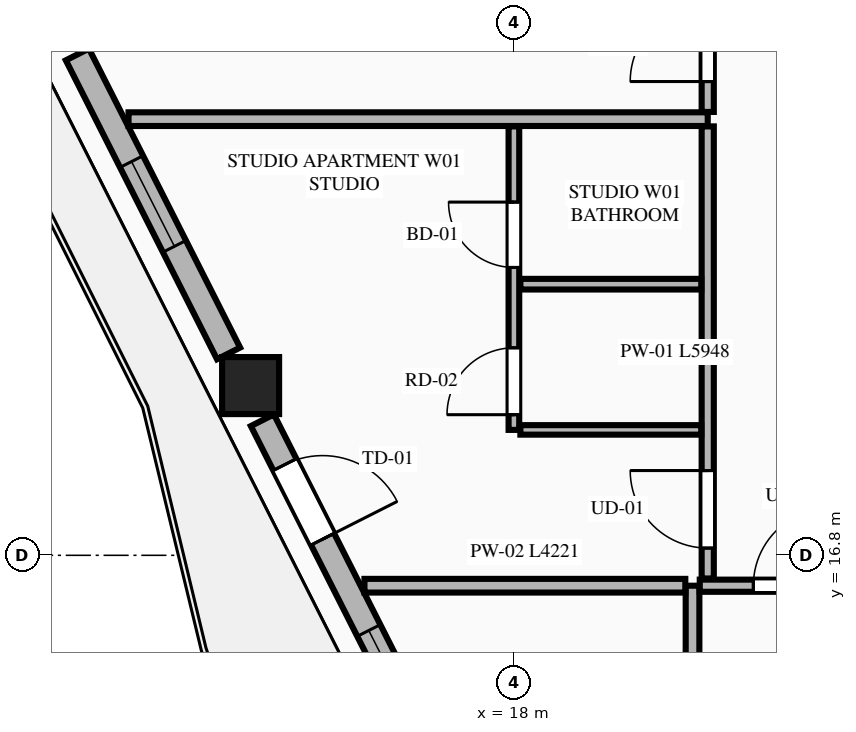
"""IFC4 building model, lengths in metres.
Left out: names, types, materials, properties, quantities, classifications, styles, units other than length and angle.
Written with IfcOpenShell. Run it as: python <this file> out.ifc"""

import sys

from ifc_helpers import new_model, si_unit, direction, frame, frame_2d, origin, origin_2d, place, context, subcontext, project, spatial, rectangle, extrude, element, fill, save


model = new_model("IFC4")
c1 = context("Model", 3, precision=1e-05, world=origin(), true_north=direction((0.0, 1.0)))
c2 = subcontext(c1, "Body", "Model", "MODEL_VIEW")
j1 = project(units=[si_unit("LENGTHUNIT", "METRE"), si_unit("PLANEANGLEUNIT", "RADIAN")], contexts=[c1])
p1 = place(None, origin())
s1 = spatial("IfcSite", under=j1, at=p1, CompositionType="ELEMENT")
p2 = place(p1, origin())
s2 = spatial("IfcBuilding", under=s1, at=p2, CompositionType="ELEMENT")
p3 = place(p2, frame((0.0, 0.0, 245.25)))
s3 = spatial("IfcBuildingStorey", under=s2, at=p3, CompositionType="ELEMENT", Elevation=245.25)
p4 = place(p3, frame((14.536, 19.033, 0.0), z_axis=(0.0, 0.0, 1.0), x_axis=(1.0, 0.0, 0.0)))
e1 = element("IfcColumn", 1, at=p4, inside=s3, PredefinedType="COLUMN", context=c2, shape_type="SweptSolid", body=[
    extrude(rectangle(XDim=0.75, YDim=0.75, at=origin_2d()), origin(), (0.0, 0.0, 1.0), 3.65),
])
p5 = place(p3, frame((12.257, 23.389, 0.0), z_axis=(0.0, 0.0, 1.0), x_axis=(0.45130817501, -0.892368158984, 0.0)))
e2 = element("IfcWall", 2, at=p5, inside=s3, PredefinedType="STANDARD", context=c2, shape_type="SweptSolid", body=[
    extrude(rectangle(XDim=4.407, YDim=0.34, at=frame_2d((2.204, 0.0))), origin(), (0.0, 0.0, 1.0), 2.983),
])
p6 = place(p5, frame((1.579, 0.0, 0.75)))
e3 = element("IfcOpeningElement", 3, at=p6, cuts=e2, PredefinedType="OPENING", context=c2, shape_type="SweptSolid", body=[
    extrude(rectangle(XDim=1.25, YDim=1.95, at=frame_2d((0.625, 0.975))), frame((0.0, 0.18, 0.0), z_axis=(0.0, -1.0, 0.0), x_axis=(1.0, 0.0, 0.0)), (0.0, 0.0, 1.0), 0.36),
])
p7 = place(p3, frame((14.691, 18.577, 0.0), z_axis=(0.0, 0.0, 1.0), x_axis=(0.451581819983, -0.892229712496, 0.0)))
e4 = element("IfcWall", 4, at=p7, inside=s3, PredefinedType="STANDARD", context=c2, shape_type="SweptSolid", body=[
    extrude(rectangle(XDim=4.6, YDim=0.34, at=frame_2d((2.3, 0.0))), origin(), (0.0, 0.0, 1.0), 2.983),
])
p8 = place(p7, frame((0.654, 0.0, 0.0)))
e5 = element("IfcOpeningElement", 5, at=p8, cuts=e4, PredefinedType="OPENING", context=c2, shape_type="SweptSolid", body=[
    extrude(rectangle(XDim=1.1, YDim=2.25, at=frame_2d((0.55, 1.125))), frame((0.0, 0.18, 0.0), z_axis=(0.0, -1.0, 0.0), x_axis=(1.0, 0.0, 0.0)), (0.0, 0.0, 1.0), 0.36),
])
p9 = place(p7, frame((3.1, 0.0, 0.75)))
e6 = element("IfcOpeningElement", 6, at=p9, cuts=e4, PredefinedType="OPENING", context=c2, shape_type="SweptSolid", body=[
    extrude(rectangle(XDim=1.1, YDim=2.0, at=frame_2d((0.55, 1.0))), frame((0.0, 0.18, 0.0), z_axis=(0.0, -1.0, 0.0), x_axis=(1.0, 0.0, 0.0)), (0.0, 0.0, 1.0), 0.36),
])
p10 = place(p3, frame((20.35, 8.119, 0.0), z_axis=(0.0, 0.0, 1.0), x_axis=(0.0, 1.0, 0.0)))
e7 = element("IfcWall", 7, at=p10, inside=s3, PredefinedType="PARTITIONING", context=c2, shape_type="SweptSolid", body=[
    extrude(rectangle(XDim=8.281, YDim=0.18, at=frame_2d((4.141, 0.0))), origin(), (0.0, 0.0, 1.0), 3.45),
])
p11 = place(p3, frame((20.445, 16.4, 0.0), z_axis=(0.0, 0.0, 1.0), x_axis=(1.0, 0.0, 0.0)))
e8 = element("IfcWall", 8, at=p11, inside=s3, PredefinedType="PARTITIONING", context=c2, shape_type="SweptSolid", body=[
    extrude(rectangle(XDim=8.606, YDim=0.16, at=frame_2d((4.303, 0.0))), origin(), (0.0, 0.0, 1.0), 3.45),
])
p12 = place(p11, frame((0.705, 0.0, 0.0)))
e9 = element("IfcOpeningElement", 9, at=p12, cuts=e8, PredefinedType="OPENING", context=c2, shape_type="SweptSolid", body=[
    extrude(rectangle(XDim=1.02, YDim=2.25, at=frame_2d((0.51, 1.125))), frame((0.0, 0.09, 0.0), z_axis=(0.0, -1.0, 0.0), x_axis=(1.0, 0.0, 0.0)), (0.0, 0.0, 1.0), 0.18),
])
p13 = place(p3, frame((16.034, 16.4, 0.0), z_axis=(0.0, 0.0, 1.0), x_axis=(1.0, 0.0, 0.0)))
e10 = element("IfcWall", 10, at=p13, inside=s3, PredefinedType="PARTITIONING", context=c2, shape_type="SweptSolid", body=[
    extrude(rectangle(XDim=4.221, YDim=0.18, at=frame_2d((2.11, 0.0))), origin(), (0.0, 0.0, 1.0), 3.45),
])
p14 = place(p3, frame((20.55, 16.495, 0.0), z_axis=(0.0, 0.0, 1.0), x_axis=(0.0, 1.0, 0.0)))
e11 = element("IfcWall", 11, at=p14, inside=s3, PredefinedType="PARTITIONING", context=c2, shape_type="SweptSolid", body=[
    extrude(rectangle(XDim=5.948, YDim=0.16, at=frame_2d((2.974, 0.0))), origin(), (0.0, 0.0, 1.0), 3.137),
])
p15 = place(p14, frame((0.4, 0.0, 0.0)))
e12 = element("IfcOpeningElement", 12, at=p15, cuts=e11, PredefinedType="OPENING", context=c2, shape_type="SweptSolid", body=[
    extrude(rectangle(XDim=1.02, YDim=2.25, at=frame_2d((0.51, 1.125))), frame((0.0, 0.09, 0.0), z_axis=(0.0, -1.0, 0.0), x_axis=(1.0, 0.0, 0.0)), (0.0, 0.0, 1.0), 0.18),
])
p16 = place(p3, frame((18.085, 18.45, 0.0), z_axis=(0.0, 0.0, 1.0), x_axis=(1.0, 0.0, 0.0)))
e13 = element("IfcWall", 13, at=p16, inside=s3, PredefinedType="PARTITIONING", context=c2, shape_type="SweptSolid", body=[
    extrude(rectangle(XDim=2.38, YDim=0.125, at=frame_2d((1.19, 0.0))), origin(), (0.0, 0.0, 1.0), 3.45),
])
p17 = place(p3, frame((18.0, 18.45, 0.0), z_axis=(0.0, 0.0, 1.0), x_axis=(0.0, 1.0, 0.0)))
e14 = element("IfcWall", 14, at=p17, inside=s3, PredefinedType="PLUMBINGWALL", context=c2, shape_type="SweptSolid", body=[
    extrude(rectangle(XDim=3.993, YDim=0.14, at=frame_2d((1.997, 0.0))), origin(), (0.0, 0.0, 1.0), 3.45),
])
p18 = place(p17, frame((2.137, 0.0, 0.0)))
e15 = element("IfcOpeningElement", 15, at=p18, cuts=e14, PredefinedType="OPENING", context=c2, shape_type="SweptSolid", body=[
    extrude(rectangle(XDim=0.86, YDim=2.1, at=frame_2d((0.43, 1.05))), frame((0.0, 0.08, 0.0), z_axis=(0.0, -1.0, 0.0), x_axis=(1.0, 0.0, 0.0)), (0.0, 0.0, 1.0), 0.16),
])
p19 = place(p17, frame((0.2, 0.0, 0.0)))
e16 = element("IfcOpeningElement", 16, at=p19, cuts=e14, PredefinedType="OPENING", context=c2, shape_type="SweptSolid", body=[
    extrude(rectangle(XDim=0.88, YDim=2.15, at=frame_2d((0.44, 1.075))), frame((0.0, 0.08, 0.0), z_axis=(0.0, -1.0, 0.0), x_axis=(1.0, 0.0, 0.0)), (0.0, 0.0, 1.0), 0.16),
])
p20 = place(p3, frame((18.085, 20.367, 0.0), z_axis=(0.0, 0.0, 1.0), x_axis=(1.0, 0.0, 0.0)))
e17 = element("IfcWall", 17, at=p20, inside=s3, PredefinedType="PLUMBINGWALL", context=c2, shape_type="SweptSolid", body=[
    extrude(rectangle(XDim=2.38, YDim=0.14, at=frame_2d((1.19, 0.0))), origin(), (0.0, 0.0, 1.0), 3.45),
])
p21 = place(p3, frame((12.93, 22.538, 0.0), z_axis=(0.0, 0.0, 1.0), x_axis=(1.0, 0.0, 0.0)))
e18 = element("IfcWall", 18, at=p21, inside=s3, PredefinedType="PARTITIONING", context=c2, shape_type="SweptSolid", body=[
    extrude(rectangle(XDim=7.62, YDim=0.18, at=frame_2d((3.81, 0.0))), origin(), (0.0, 0.0, 1.0), 3.45),
])
p22 = place(p3, frame((20.55, 22.633, 0.0), z_axis=(0.0, 0.0, 1.0), x_axis=(0.0, 1.0, 0.0)))
e19 = element("IfcWall", 19, at=p22, inside=s3, PredefinedType="PARTITIONING", context=c2, shape_type="SweptSolid", body=[
    extrude(rectangle(XDim=6.134, YDim=0.16, at=frame_2d((3.067, 0.0))), origin(), (0.0, 0.0, 1.0), 3.137),
])
p23 = place(p22, frame((0.4, 0.0, 0.0)))
e20 = element("IfcOpeningElement", 20, at=p23, cuts=e19, PredefinedType="OPENING", context=c2, shape_type="SweptSolid", body=[
    extrude(rectangle(XDim=1.02, YDim=2.25, at=frame_2d((0.51, 1.125))), frame((0.0, 0.09, 0.0), z_axis=(0.0, -1.0, 0.0), x_axis=(1.0, 0.0, 0.0)), (0.0, 0.0, 1.0), 0.18),
])
p24 = place(p6, origin())
e21 = element("IfcWindow", 21, at=p24, inside=s3, PartitioningType="SINGLE_PANEL", PredefinedType="WINDOW", context=c2, shape_type="SweptSolid", body=[
    extrude(rectangle(XDim=1.25, YDim=1.95, at=frame_2d((0.625, 0.975))), frame((0.0, 0.03, 0.0), z_axis=(0.0, -1.0, 0.0), x_axis=(1.0, 0.0, 0.0)), (0.0, 0.0, 1.0), 0.06),
])
fill(e3, e21)
p25 = place(p8, origin())
e22 = element("IfcDoor", 22, at=p25, inside=s3, OperationType="SINGLE_SWING_RIGHT", PredefinedType="DOOR", context=c2, shape_type="SweptSolid", body=[
    extrude(rectangle(XDim=1.1, YDim=2.25, at=frame_2d((0.55, 1.125))), frame((0.0, 0.025, 0.0), z_axis=(0.0, -1.0, 0.0), x_axis=(1.0, 0.0, 0.0)), (0.0, 0.0, 1.0), 0.05),
])
fill(e5, e22)
p26 = place(p12, origin())
e23 = element("IfcDoor", 23, at=p26, inside=s3, OperationType="SINGLE_SWING_RIGHT", PredefinedType="DOOR", context=c2, shape_type="SweptSolid", body=[
    extrude(rectangle(XDim=1.02, YDim=2.25, at=frame_2d((0.51, 1.125))), frame((0.0, 0.025, 0.0), z_axis=(0.0, -1.0, 0.0), x_axis=(1.0, 0.0, 0.0)), (0.0, 0.0, 1.0), 0.05),
])
fill(e9, e23)
p27 = place(p18, origin())
e24 = element("IfcDoor", 24, at=p27, inside=s3, OperationType="SINGLE_SWING_RIGHT", PredefinedType="DOOR", context=c2, shape_type="SweptSolid", body=[
    extrude(rectangle(XDim=0.86, YDim=2.1, at=frame_2d((0.43, 1.05))), frame((0.0, 0.025, 0.0), z_axis=(0.0, -1.0, 0.0), x_axis=(1.0, 0.0, 0.0)), (0.0, 0.0, 1.0), 0.05),
])
fill(e15, e24)
p28 = place(p15, origin())
e25 = element("IfcDoor", 25, at=p28, inside=s3, OperationType="SINGLE_SWING_RIGHT", PredefinedType="DOOR", context=c2, shape_type="SweptSolid", body=[
    extrude(rectangle(XDim=1.02, YDim=2.25, at=frame_2d((0.51, 1.125))), frame((0.0, 0.025, 0.0), z_axis=(0.0, -1.0, 0.0), x_axis=(1.0, 0.0, 0.0)), (0.0, 0.0, 1.0), 0.05),
])
fill(e12, e25)
p29 = place(p19, origin())
e26 = element("IfcDoor", 26, at=p29, inside=s3, OperationType="SINGLE_SWING_LEFT", PredefinedType="DOOR", context=c2, shape_type="SweptSolid", body=[
    extrude(rectangle(XDim=0.88, YDim=2.15, at=frame_2d((0.44, 1.075))), frame((0.0, 0.025, 0.0), z_axis=(0.0, -1.0, 0.0), x_axis=(1.0, 0.0, 0.0)), (0.0, 0.0, 1.0), 0.05),
])
fill(e16, e26)
p30 = place(p23, origin())
e27 = element("IfcDoor", 27, at=p30, inside=s3, OperationType="SINGLE_SWING_LEFT", PredefinedType="DOOR", context=c2, shape_type="SweptSolid", body=[
    extrude(rectangle(XDim=1.02, YDim=2.25, at=frame_2d((0.51, 1.125))), frame((0.0, 0.025, 0.0), z_axis=(0.0, -1.0, 0.0), x_axis=(1.0, 0.0, 0.0)), (0.0, 0.0, 1.0), 0.05),
])
fill(e20, e27)
p31 = place(p9, origin())
e28 = element("IfcWindow", 28, at=p31, inside=s3, PartitioningType="SINGLE_PANEL", PredefinedType="WINDOW", context=c2, shape_type="SweptSolid", body=[
    extrude(rectangle(XDim=1.1, YDim=2.0, at=frame_2d((0.55, 1.0))), frame((0.0, 0.03, 0.0), z_axis=(0.0, -1.0, 0.0), x_axis=(1.0, 0.0, 0.0)), (0.0, 0.0, 1.0), 0.06),
])
fill(e6, e28)
save(model, sys.argv[1])
